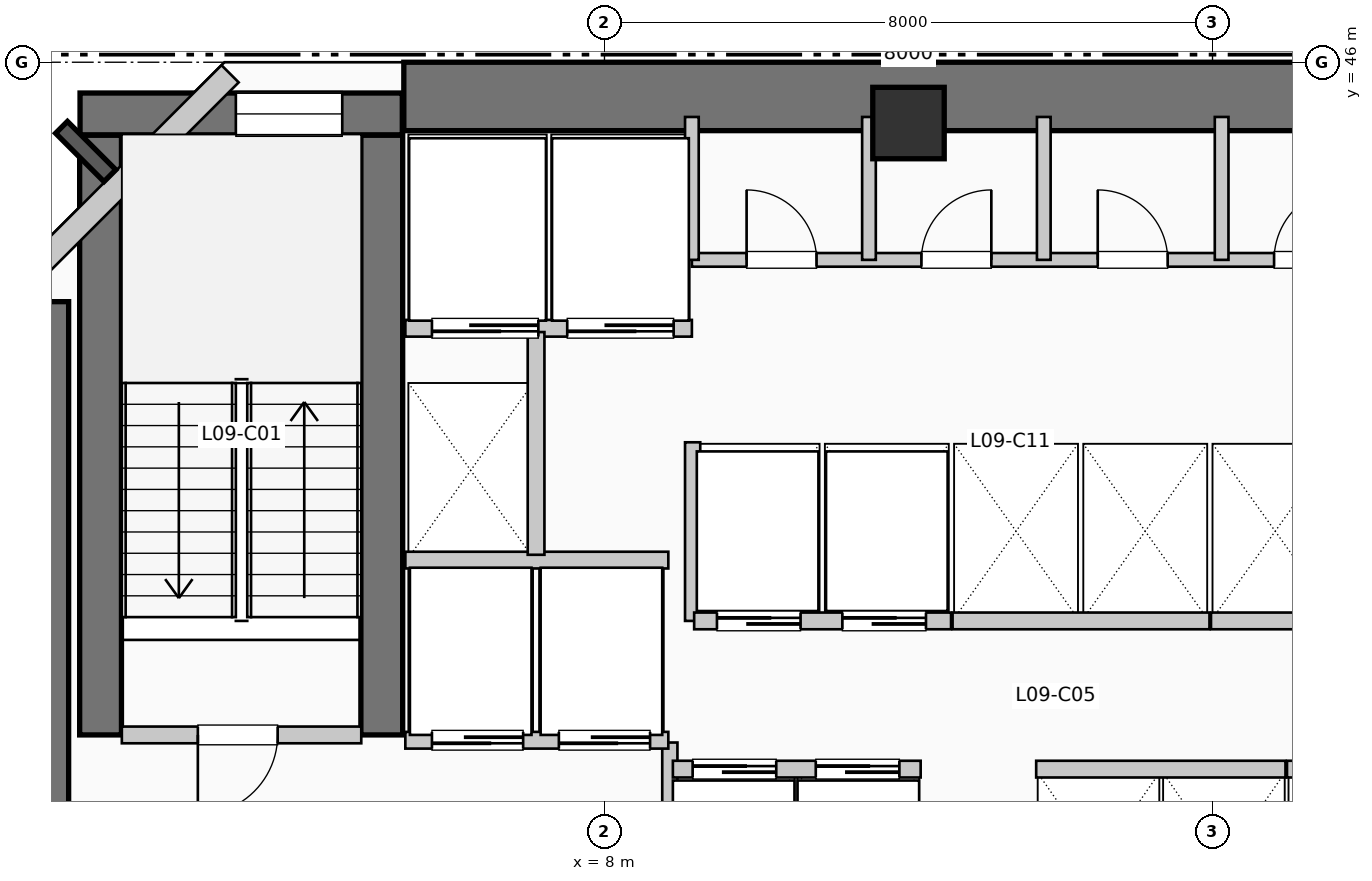
"""IFC4 building model, lengths in metres.
Left out: names, types, materials, properties, quantities, classifications, styles, units other than length and angle.
Written with IfcOpenShell. Run it as: python <this file> out.ifc"""

import sys

from ifc_helpers import new_model, si_unit, direction, frame, frame_2d, origin, origin_2d, place, context, subcontext, project, spatial, rectangle, extrude, element, fill, save


model = new_model("IFC4")
c1 = context("Model", 3, precision=1e-05, world=origin(), true_north=direction((0.0, 1.0)))
c2 = subcontext(c1, "Body", "Model", "MODEL_VIEW")
j1 = project(units=[si_unit("LENGTHUNIT", "METRE"), si_unit("PLANEANGLEUNIT", "RADIAN")], contexts=[c1])
p1 = place(None, origin())
s1 = spatial("IfcSite", under=j1, at=p1, CompositionType="ELEMENT")
p2 = place(p1, origin())
s2 = spatial("IfcBuilding", under=s1, at=p2, CompositionType="ELEMENT")
p3 = place(p2, frame((0.0, 0.0, 42.24)))
s3 = spatial("IfcBuildingStorey", under=s2, at=p3, CompositionType="ELEMENT", Elevation=42.24)
p4 = place(p3, frame((5.36, 45.55, 0.0), z_axis=(0.0, 0.0, 1.0), x_axis=(1.0, 0.0, 0.0)))
e1 = element("IfcWall", 1, at=p4, inside=s3, PredefinedType="SHEAR", context=c2, shape_type="SweptSolid", body=[
    extrude(rectangle(XDim=13.98, YDim=0.9, at=frame_2d((6.99, 0.0))), origin(), (0.0, 0.0, 1.0), 3.96),
])
p5 = place(p3, frame((0.5, 34.95, 0.0), z_axis=(0.0, 0.0, 1.0), x_axis=(0.0, 1.0, 0.0)))
e2 = element("IfcWall", 2, at=p5, inside=s3, PredefinedType="SHEAR", context=c2, shape_type="SweptSolid", body=[
    extrude(rectangle(XDim=7.9, YDim=0.9, at=frame_2d((3.95, 0.0))), origin(), (0.0, 0.0, 1.0), 3.96),
])
for number, where, z_axis, x_axis in (
    (3, (1.37, 37.15, 0.0), (0.0, 0.0, 1.0), (0.0, 1.0, 0.0)),
    (4, (5.07, 37.15, 0.0), (0.0, 0.0, 1.0), (0.0, 1.0, 0.0)),
):
    element("IfcWall", number, at=place(p3, frame(where, z_axis=z_axis, x_axis=x_axis)), inside=s3, PredefinedType="SHEAR", context=c2, shape_type="SweptSolid", body=[
        extrude(rectangle(XDim=7.89, YDim=0.55, at=frame_2d((3.945, 0.0))), origin(), (0.0, 0.0, 1.0), 3.96),
    ])
p6 = place(p3, frame((1.1, 45.32, 0.0), z_axis=(0.0, 0.0, 1.0), x_axis=(1.0, 0.0, 0.0)))
e5 = element("IfcWall", 5, at=p6, inside=s3, PredefinedType="SHEAR", context=c2, shape_type="SweptSolid", body=[
    extrude(rectangle(XDim=4.24, YDim=0.55, at=frame_2d((2.12, 0.0))), origin(), (0.0, 0.0, 1.0), 3.96),
])
p7 = place(p6, frame((2.05, 0.0, 1.05)))
e6 = element("IfcOpeningElement", 6, at=p7, cuts=e5, PredefinedType="OPENING", context=c2, shape_type="SweptSolid", body=[
    extrude(rectangle(XDim=1.4, YDim=1.8, at=frame_2d((0.7, 0.9))), frame((0.0, 0.285, 0.0), z_axis=(0.0, -1.0, 0.0), x_axis=(1.0, 0.0, 0.0)), (0.0, 0.0, 1.0), 0.57),
])
p8 = place(p3, frame((12.0, 45.2, 0.0), z_axis=(0.0, 0.0, 1.0), x_axis=(1.0, 0.0, 0.0)))
e7 = element("IfcColumn", 7, at=p8, inside=s3, PredefinedType="COLUMN", context=c2, shape_type="SweptSolid", body=[
    extrude(rectangle(XDim=0.94, YDim=0.94, at=origin_2d()), origin(), (0.0, 0.0, 1.0), 3.96),
])
p9 = place(p3, frame((3.074, 45.848, 0.0), z_axis=(0.0, 0.0, 1.0), x_axis=(-0.707106781187, -0.707106781187, 0.0)))
e8 = element("IfcWall", 8, at=p9, inside=s3, PredefinedType="SOLIDWALL", context=c2, shape_type="SweptSolid", body=[
    extrude(rectangle(XDim=4.133, YDim=0.32, at=frame_2d((2.066, 0.0))), origin(), (0.0, 0.0, 1.0), 3.71),
])
p10 = place(p3, frame((1.65, 37.15, 0.0), z_axis=(0.0, 0.0, 1.0), x_axis=(1.0, 0.0, 0.0)))
e9 = element("IfcWall", 9, at=p10, inside=s3, PredefinedType="PARTITIONING", context=c2, shape_type="SweptSolid", body=[
    extrude(rectangle(XDim=3.15, YDim=0.22, at=frame_2d((1.575, 0.0))), origin(), (0.0, 0.0, 1.0), 3.71),
])
p11 = place(p10, frame((2.05, 0.0, 0.0), z_axis=(0.0, 0.0, 1.0), x_axis=(-1.0, 0.0, 0.0)))
e10 = element("IfcOpeningElement", 10, at=p11, cuts=e9, PredefinedType="OPENING", context=c2, shape_type="SweptSolid", body=[
    extrude(rectangle(XDim=1.05, YDim=2.15, at=frame_2d((0.525, 1.075))), frame((0.0, 0.12, 0.0), z_axis=(0.0, -1.0, 0.0), x_axis=(1.0, 0.0, 0.0)), (0.0, 0.0, 1.0), 0.24),
])
p12 = place(p3, frame((8.86, 34.55, 0.0), z_axis=(0.0, 0.0, 1.0), x_axis=(0.0, 1.0, 0.0)))
e11 = element("IfcWall", 11, at=p12, inside=s3, PredefinedType="PARTITIONING", context=c2, shape_type="SweptSolid", body=[
    extrude(rectangle(XDim=2.5, YDim=0.2, at=frame_2d((1.25, 0.0))), origin(), (0.0, 0.0, 1.0), 3.71),
])
p13 = place(p3, frame((5.38, 37.08, 0.0), z_axis=(0.0, 0.0, 1.0), x_axis=(1.0, 0.0, 0.0)))
e12 = element("IfcWall", 12, at=p13, inside=s3, PredefinedType="PARTITIONING", context=c2, shape_type="SweptSolid", body=[
    extrude(rectangle(XDim=3.46, YDim=0.22, at=frame_2d((1.73, 0.0))), origin(), (0.0, 0.0, 1.0), 3.71),
])
p14 = place(p13, frame((1.55, 0.0, 0.0), z_axis=(0.0, 0.0, 1.0), x_axis=(-1.0, 0.0, 0.0)))
e13 = element("IfcOpeningElement", 13, at=p14, cuts=e12, PredefinedType="OPENING", context=c2, shape_type="SweptSolid", body=[
    extrude(rectangle(XDim=1.2, YDim=2.2, at=frame_2d((0.6, 1.1))), frame((0.0, 0.12, 0.0), z_axis=(0.0, -1.0, 0.0), x_axis=(1.0, 0.0, 0.0)), (0.0, 0.0, 1.0), 0.24),
])
p15 = place(p13, frame((3.22, 0.0, 0.0), z_axis=(0.0, 0.0, 1.0), x_axis=(-1.0, 0.0, 0.0)))
e14 = element("IfcOpeningElement", 14, at=p15, cuts=e12, PredefinedType="OPENING", context=c2, shape_type="SweptSolid", body=[
    extrude(rectangle(XDim=1.2, YDim=2.2, at=frame_2d((0.6, 1.1))), frame((0.0, 0.12, 0.0), z_axis=(0.0, -1.0, 0.0), x_axis=(1.0, 0.0, 0.0)), (0.0, 0.0, 1.0), 0.24),
])
p16 = place(p3, frame((5.38, 39.45, 0.0), z_axis=(0.0, 0.0, 1.0), x_axis=(1.0, 0.0, 0.0)))
e15 = element("IfcWall", 15, at=p16, inside=s3, PredefinedType="PARTITIONING", context=c2, shape_type="SweptSolid", body=[
    extrude(rectangle(XDim=3.46, YDim=0.22, at=frame_2d((1.73, 0.0))), origin(), (0.0, 0.0, 1.0), 3.71),
])
p17 = place(p3, frame((5.38, 42.5, 0.0), z_axis=(0.0, 0.0, 1.0), x_axis=(1.0, 0.0, 0.0)))
e16 = element("IfcWall", 16, at=p17, inside=s3, PredefinedType="PARTITIONING", context=c2, shape_type="SweptSolid", body=[
    extrude(rectangle(XDim=3.77, YDim=0.22, at=frame_2d((1.885, 0.0))), origin(), (0.0, 0.0, 1.0), 3.71),
])
p18 = place(p17, frame((1.75, 0.0, 0.0), z_axis=(0.0, 0.0, 1.0), x_axis=(-1.0, 0.0, 0.0)))
e17 = element("IfcOpeningElement", 17, at=p18, cuts=e16, PredefinedType="OPENING", context=c2, shape_type="SweptSolid", body=[
    extrude(rectangle(XDim=1.4, YDim=2.2, at=frame_2d((0.7, 1.1))), frame((0.0, 0.12, 0.0), z_axis=(0.0, -1.0, 0.0), x_axis=(1.0, 0.0, 0.0)), (0.0, 0.0, 1.0), 0.24),
])
p19 = place(p17, frame((3.53, 0.0, 0.0), z_axis=(0.0, 0.0, 1.0), x_axis=(-1.0, 0.0, 0.0)))
e18 = element("IfcOpeningElement", 18, at=p19, cuts=e16, PredefinedType="OPENING", context=c2, shape_type="SweptSolid", body=[
    extrude(rectangle(XDim=1.4, YDim=2.2, at=frame_2d((0.7, 1.1))), frame((0.0, 0.12, 0.0), z_axis=(0.0, -1.0, 0.0), x_axis=(1.0, 0.0, 0.0)), (0.0, 0.0, 1.0), 0.24),
])
p20 = place(p3, frame((7.1, 39.52, 0.0), z_axis=(0.0, 0.0, 1.0), x_axis=(0.0, 1.0, 0.0)))
e19 = element("IfcWall", 19, at=p20, inside=s3, PredefinedType="PARTITIONING", context=c2, shape_type="SweptSolid", body=[
    extrude(rectangle(XDim=2.93, YDim=0.22, at=frame_2d((1.465, 0.0))), origin(), (0.0, 0.0, 1.0), 3.71),
])
p21 = place(p3, frame((9.16, 38.65, 0.0), z_axis=(0.0, 0.0, 1.0), x_axis=(0.0, 1.0, 0.0)))
e20 = element("IfcWall", 20, at=p21, inside=s3, PredefinedType="PARTITIONING", context=c2, shape_type="SweptSolid", body=[
    extrude(rectangle(XDim=2.35, YDim=0.2, at=frame_2d((1.175, 0.0))), origin(), (0.0, 0.0, 1.0), 3.71),
])
p22 = place(p3, frame((8.9, 36.7, 0.0), z_axis=(0.0, 0.0, 1.0), x_axis=(1.0, 0.0, 0.0)))
e21 = element("IfcWall", 21, at=p22, inside=s3, PredefinedType="PARTITIONING", context=c2, shape_type="SweptSolid", body=[
    extrude(rectangle(XDim=3.26, YDim=0.22, at=frame_2d((1.63, 0.0))), origin(), (0.0, 0.0, 1.0), 3.71),
])
p23 = place(p22, frame((0.26, 0.0, 0.0)))
e22 = element("IfcOpeningElement", 22, at=p23, cuts=e21, PredefinedType="OPENING", context=c2, shape_type="SweptSolid", body=[
    extrude(rectangle(XDim=1.1, YDim=2.2, at=frame_2d((0.55, 1.1))), frame((0.0, 0.12, 0.0), z_axis=(0.0, -1.0, 0.0), x_axis=(1.0, 0.0, 0.0)), (0.0, 0.0, 1.0), 0.24),
])
p24 = place(p22, frame((1.88, 0.0, 0.0)))
e23 = element("IfcOpeningElement", 23, at=p24, cuts=e21, PredefinedType="OPENING", context=c2, shape_type="SweptSolid", body=[
    extrude(rectangle(XDim=1.1, YDim=2.2, at=frame_2d((0.55, 1.1))), frame((0.0, 0.12, 0.0), z_axis=(0.0, -1.0, 0.0), x_axis=(1.0, 0.0, 0.0)), (0.0, 0.0, 1.0), 0.24),
])
p25 = place(p3, frame((9.18, 38.65, 0.0), z_axis=(0.0, 0.0, 1.0), x_axis=(1.0, 0.0, 0.0)))
e24 = element("IfcWall", 24, at=p25, inside=s3, PredefinedType="PARTITIONING", context=c2, shape_type="SweptSolid", body=[
    extrude(rectangle(XDim=3.38, YDim=0.22, at=frame_2d((1.69, 0.0))), origin(), (0.0, 0.0, 1.0), 3.71),
])
p26 = place(p25, frame((0.3, 0.0, 0.0)))
e25 = element("IfcOpeningElement", 25, at=p26, cuts=e24, PredefinedType="OPENING", context=c2, shape_type="SweptSolid", body=[
    extrude(rectangle(XDim=1.1, YDim=2.2, at=frame_2d((0.55, 1.1))), frame((0.0, 0.12, 0.0), z_axis=(0.0, -1.0, 0.0), x_axis=(1.0, 0.0, 0.0)), (0.0, 0.0, 1.0), 0.24),
])
p27 = place(p25, frame((1.95, 0.0, 0.0)))
e26 = element("IfcOpeningElement", 26, at=p27, cuts=e24, PredefinedType="OPENING", context=c2, shape_type="SweptSolid", body=[
    extrude(rectangle(XDim=1.1, YDim=2.2, at=frame_2d((0.55, 1.1))), frame((0.0, 0.12, 0.0), z_axis=(0.0, -1.0, 0.0), x_axis=(1.0, 0.0, 0.0)), (0.0, 0.0, 1.0), 0.24),
])
p28 = place(p3, frame((13.68, 36.7, 0.0), z_axis=(0.0, 0.0, 1.0), x_axis=(1.0, 0.0, 0.0)))
e27 = element("IfcWall", 27, at=p28, inside=s3, PredefinedType="PARTITIONING", context=c2, shape_type="SweptSolid", body=[
    extrude(rectangle(XDim=3.28, YDim=0.22, at=frame_2d((1.64, 0.0))), origin(), (0.0, 0.0, 1.0), 3.71),
])
p29 = place(p3, frame((12.58, 38.65, 0.0), z_axis=(0.0, 0.0, 1.0), x_axis=(1.0, 0.0, 0.0)))
e28 = element("IfcWall", 28, at=p29, inside=s3, PredefinedType="PARTITIONING", context=c2, shape_type="SweptSolid", body=[
    extrude(rectangle(XDim=3.38, YDim=0.22, at=frame_2d((1.69, 0.0))), origin(), (0.0, 0.0, 1.0), 3.71),
])
p30 = place(p3, frame((16.98, 36.7, 0.0), z_axis=(0.0, 0.0, 1.0), x_axis=(1.0, 0.0, 0.0)))
e29 = element("IfcWall", 29, at=p30, inside=s3, PredefinedType="PARTITIONING", context=c2, shape_type="SweptSolid", body=[
    extrude(rectangle(XDim=1.7, YDim=0.22, at=frame_2d((0.85, 0.0))), origin(), (0.0, 0.0, 1.0), 3.71),
])
p31 = place(p3, frame((15.98, 38.65, 0.0), z_axis=(0.0, 0.0, 1.0), x_axis=(1.0, 0.0, 0.0)))
e30 = element("IfcWall", 30, at=p31, inside=s3, PredefinedType="PARTITIONING", context=c2, shape_type="SweptSolid", body=[
    extrude(rectangle(XDim=1.72, YDim=0.22, at=frame_2d((0.86, 0.0))), origin(), (0.0, 0.0, 1.0), 3.71),
])
p32 = place(p3, frame((9.15, 43.4, 0.0), z_axis=(0.0, 0.0, 1.0), x_axis=(1.0, 0.0, 0.0)))
e31 = element("IfcWall", 31, at=p32, inside=s3, PredefinedType="PLUMBINGWALL", context=c2, shape_type="SweptSolid", body=[
    extrude(rectangle(XDim=9.33, YDim=0.18, at=frame_2d((4.665, 0.0))), origin(), (0.0, 0.0, 1.0), 3.71),
])
p33 = place(p32, frame((0.72, 0.0, 0.0)))
e32 = element("IfcOpeningElement", 32, at=p33, cuts=e31, PredefinedType="OPENING", context=c2, shape_type="SweptSolid", body=[
    extrude(rectangle(XDim=0.92, YDim=2.1, at=frame_2d((0.46, 1.05))), frame((0.0, 0.1, 0.0), z_axis=(0.0, -1.0, 0.0), x_axis=(1.0, 0.0, 0.0)), (0.0, 0.0, 1.0), 0.2),
])
p34 = place(p32, frame((3.02, 0.0, 0.0)))
e33 = element("IfcOpeningElement", 33, at=p34, cuts=e31, PredefinedType="OPENING", context=c2, shape_type="SweptSolid", body=[
    extrude(rectangle(XDim=0.92, YDim=2.1, at=frame_2d((0.46, 1.05))), frame((0.0, 0.1, 0.0), z_axis=(0.0, -1.0, 0.0), x_axis=(1.0, 0.0, 0.0)), (0.0, 0.0, 1.0), 0.2),
])
p35 = place(p32, frame((5.34, 0.0, 0.0)))
e34 = element("IfcOpeningElement", 34, at=p35, cuts=e31, PredefinedType="OPENING", context=c2, shape_type="SweptSolid", body=[
    extrude(rectangle(XDim=0.92, YDim=2.1, at=frame_2d((0.46, 1.05))), frame((0.0, 0.1, 0.0), z_axis=(0.0, -1.0, 0.0), x_axis=(1.0, 0.0, 0.0)), (0.0, 0.0, 1.0), 0.2),
])
p36 = place(p32, frame((7.66, 0.0, 0.0)))
e35 = element("IfcOpeningElement", 35, at=p36, cuts=e31, PredefinedType="OPENING", context=c2, shape_type="SweptSolid", body=[
    extrude(rectangle(XDim=0.95, YDim=2.1, at=frame_2d((0.475, 1.05))), frame((0.0, 0.1, 0.0), z_axis=(0.0, -1.0, 0.0), x_axis=(1.0, 0.0, 0.0)), (0.0, 0.0, 1.0), 0.2),
])
for number, where, z_axis, x_axis in (
    (36, (9.15, 43.4, 0.0), (0.0, 0.0, 1.0), (0.0, 1.0, 0.0)),
    (37, (11.48, 43.4, 0.0), (0.0, 0.0, 1.0), (0.0, 1.0, 0.0)),
    (38, (13.78, 43.4, 0.0), (0.0, 0.0, 1.0), (0.0, 1.0, 0.0)),
    (39, (16.12, 43.4, 0.0), (0.0, 0.0, 1.0), (0.0, 1.0, 0.0)),
):
    element("IfcWall", number, at=place(p3, frame(where, z_axis=z_axis, x_axis=x_axis)), inside=s3, PredefinedType="PLUMBINGWALL", context=c2, shape_type="SweptSolid", body=[
        extrude(rectangle(XDim=1.88, YDim=0.18, at=frame_2d((0.94, 0.0))), origin(), (0.0, 0.0, 1.0), 3.71),
    ])
p37 = place(p7, origin())
e40 = element("IfcWindow", 40, at=p37, inside=s3, PartitioningType="SINGLE_PANEL", PredefinedType="WINDOW", context=c2, shape_type="SweptSolid", body=[
    extrude(rectangle(XDim=1.4, YDim=1.8, at=frame_2d((0.7, 0.9))), frame((0.0, 0.03, 0.0), z_axis=(0.0, -1.0, 0.0), x_axis=(1.0, 0.0, 0.0)), (0.0, 0.0, 1.0), 0.06),
])
fill(e6, e40)
p38 = place(p11, origin())
e41 = element("IfcDoor", 41, at=p38, inside=s3, OperationType="SINGLE_SWING_LEFT", PredefinedType="DOOR", context=c2, shape_type="SweptSolid", body=[
    extrude(rectangle(XDim=1.05, YDim=2.15, at=frame_2d((0.525, 1.075))), frame((0.0, 0.025, 0.0), z_axis=(0.0, -1.0, 0.0), x_axis=(1.0, 0.0, 0.0)), (0.0, 0.0, 1.0), 0.05),
])
fill(e10, e41)
p39 = place(p14, origin())
e42 = element("IfcDoor", 42, at=p39, inside=s3, OperationType="SLIDING_TO_RIGHT", PredefinedType="DOOR", context=c2, shape_type="SweptSolid", body=[
    extrude(rectangle(XDim=1.2, YDim=2.2, at=frame_2d((0.6, 1.1))), frame((0.0, 0.025, 0.0), z_axis=(0.0, -1.0, 0.0), x_axis=(1.0, 0.0, 0.0)), (0.0, 0.0, 1.0), 0.05),
])
fill(e13, e42)
p40 = place(p15, origin())
e43 = element("IfcDoor", 43, at=p40, inside=s3, OperationType="SLIDING_TO_RIGHT", PredefinedType="DOOR", context=c2, shape_type="SweptSolid", body=[
    extrude(rectangle(XDim=1.2, YDim=2.2, at=frame_2d((0.6, 1.1))), frame((0.0, 0.025, 0.0), z_axis=(0.0, -1.0, 0.0), x_axis=(1.0, 0.0, 0.0)), (0.0, 0.0, 1.0), 0.05),
])
fill(e14, e43)
p41 = place(p18, origin())
e44 = element("IfcDoor", 44, at=p41, inside=s3, OperationType="SLIDING_TO_LEFT", PredefinedType="DOOR", context=c2, shape_type="SweptSolid", body=[
    extrude(rectangle(XDim=1.4, YDim=2.2, at=frame_2d((0.7, 1.1))), frame((0.0, 0.025, 0.0), z_axis=(0.0, -1.0, 0.0), x_axis=(1.0, 0.0, 0.0)), (0.0, 0.0, 1.0), 0.05),
])
fill(e17, e44)
p42 = place(p19, origin())
e45 = element("IfcDoor", 45, at=p42, inside=s3, OperationType="SLIDING_TO_LEFT", PredefinedType="DOOR", context=c2, shape_type="SweptSolid", body=[
    extrude(rectangle(XDim=1.4, YDim=2.2, at=frame_2d((0.7, 1.1))), frame((0.0, 0.025, 0.0), z_axis=(0.0, -1.0, 0.0), x_axis=(1.0, 0.0, 0.0)), (0.0, 0.0, 1.0), 0.05),
])
fill(e18, e45)
p43 = place(p23, origin())
e46 = element("IfcDoor", 46, at=p43, inside=s3, OperationType="SLIDING_TO_LEFT", PredefinedType="DOOR", context=c2, shape_type="SweptSolid", body=[
    extrude(rectangle(XDim=1.1, YDim=2.2, at=frame_2d((0.55, 1.1))), frame((0.0, 0.025, 0.0), z_axis=(0.0, -1.0, 0.0), x_axis=(1.0, 0.0, 0.0)), (0.0, 0.0, 1.0), 0.05),
])
fill(e22, e46)
p44 = place(p24, origin())
e47 = element("IfcDoor", 47, at=p44, inside=s3, OperationType="SLIDING_TO_LEFT", PredefinedType="DOOR", context=c2, shape_type="SweptSolid", body=[
    extrude(rectangle(XDim=1.1, YDim=2.2, at=frame_2d((0.55, 1.1))), frame((0.0, 0.025, 0.0), z_axis=(0.0, -1.0, 0.0), x_axis=(1.0, 0.0, 0.0)), (0.0, 0.0, 1.0), 0.05),
])
fill(e23, e47)
p45 = place(p26, origin())
e48 = element("IfcDoor", 48, at=p45, inside=s3, OperationType="SLIDING_TO_LEFT", PredefinedType="DOOR", context=c2, shape_type="SweptSolid", body=[
    extrude(rectangle(XDim=1.1, YDim=2.2, at=frame_2d((0.55, 1.1))), frame((0.0, 0.025, 0.0), z_axis=(0.0, -1.0, 0.0), x_axis=(1.0, 0.0, 0.0)), (0.0, 0.0, 1.0), 0.05),
])
fill(e25, e48)
p46 = place(p27, origin())
e49 = element("IfcDoor", 49, at=p46, inside=s3, OperationType="SLIDING_TO_LEFT", PredefinedType="DOOR", context=c2, shape_type="SweptSolid", body=[
    extrude(rectangle(XDim=1.1, YDim=2.2, at=frame_2d((0.55, 1.1))), frame((0.0, 0.025, 0.0), z_axis=(0.0, -1.0, 0.0), x_axis=(1.0, 0.0, 0.0)), (0.0, 0.0, 1.0), 0.05),
])
fill(e26, e49)
p47 = place(p33, origin())
e50 = element("IfcDoor", 50, at=p47, inside=s3, OperationType="SINGLE_SWING_LEFT", PredefinedType="DOOR", context=c2, shape_type="SweptSolid", body=[
    extrude(rectangle(XDim=0.92, YDim=2.1, at=frame_2d((0.46, 1.05))), frame((0.0, 0.025, 0.0), z_axis=(0.0, -1.0, 0.0), x_axis=(1.0, 0.0, 0.0)), (0.0, 0.0, 1.0), 0.05),
])
fill(e32, e50)
p48 = place(p34, origin())
e51 = element("IfcDoor", 51, at=p48, inside=s3, OperationType="SINGLE_SWING_RIGHT", PredefinedType="DOOR", context=c2, shape_type="SweptSolid", body=[
    extrude(rectangle(XDim=0.92, YDim=2.1, at=frame_2d((0.46, 1.05))), frame((0.0, 0.025, 0.0), z_axis=(0.0, -1.0, 0.0), x_axis=(1.0, 0.0, 0.0)), (0.0, 0.0, 1.0), 0.05),
])
fill(e33, e51)
p49 = place(p35, origin())
e52 = element("IfcDoor", 52, at=p49, inside=s3, OperationType="SINGLE_SWING_LEFT", PredefinedType="DOOR", context=c2, shape_type="SweptSolid", body=[
    extrude(rectangle(XDim=0.92, YDim=2.1, at=frame_2d((0.46, 1.05))), frame((0.0, 0.025, 0.0), z_axis=(0.0, -1.0, 0.0), x_axis=(1.0, 0.0, 0.0)), (0.0, 0.0, 1.0), 0.05),
])
fill(e34, e52)
p50 = place(p36, origin())
e53 = element("IfcDoor", 53, at=p50, inside=s3, OperationType="SINGLE_SWING_RIGHT", PredefinedType="DOOR", context=c2, shape_type="SweptSolid", body=[
    extrude(rectangle(XDim=0.95, YDim=2.1, at=frame_2d((0.475, 1.05))), frame((0.0, 0.025, 0.0), z_axis=(0.0, -1.0, 0.0), x_axis=(1.0, 0.0, 0.0)), (0.0, 0.0, 1.0), 0.05),
])
fill(e35, e53)
save(model, sys.argv[1])
